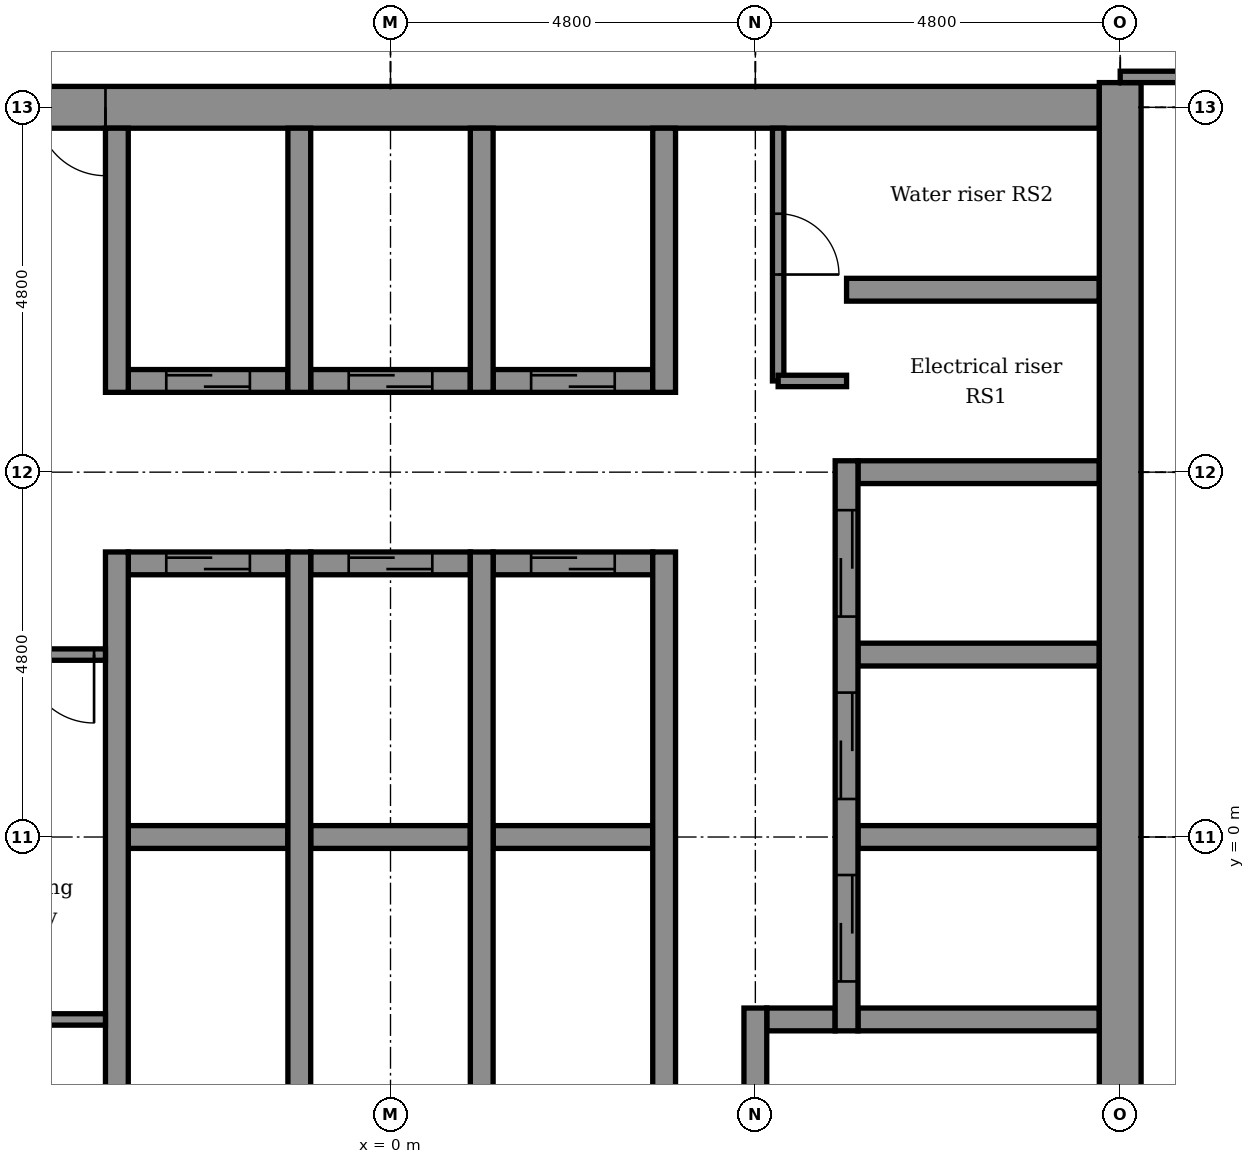
"""IFC4 building model, lengths in metres.
Left out: names, types, materials, properties, quantities, classifications, styles, units other than length and angle.
Written with IfcOpenShell. Run it as: python <this file> out.ifc"""

import sys

from ifc_helpers import new_model, si_unit, direction, frame, frame_2d, origin, place, context, subcontext, project, spatial, rectangle, extrude, element, fill, save


model = new_model("IFC4")
c1 = context("Model", 3, precision=1e-05, world=origin(), true_north=direction((0.0, 1.0)))
c2 = subcontext(c1, "Body", "Model", "MODEL_VIEW")
j1 = project(units=[si_unit("LENGTHUNIT", "METRE"), si_unit("PLANEANGLEUNIT", "RADIAN")], contexts=[c1])
p1 = place(None, origin())
s1 = spatial("IfcSite", under=j1, at=p1, CompositionType="ELEMENT")
p2 = place(p1, origin())
s2 = spatial("IfcBuilding", under=s1, at=p2, CompositionType="ELEMENT")
p3 = place(p2, frame((0.0, 0.0, 269.6)))
s3 = spatial("IfcBuildingStorey", under=s2, at=p3, CompositionType="ELEMENT", Elevation=269.6)
p4 = place(p3, frame((4.95, -2.4, -0.15), z_axis=(0.0, 0.0, 1.0), x_axis=(1.0, 0.0, 0.0)))
e1 = element("IfcWall", 1, at=p4, inside=s3, PredefinedType="STANDARD", context=c2, shape_type="SweptSolid", body=[
    extrude(rectangle(XDim=0.9, YDim=0.3, at=frame_2d((0.45, 0.0))), origin(), (0.0, 0.0, 1.0), 3.9),
])
p5 = place(p3, frame((6.15, -2.4, -0.15), z_axis=(0.0, 0.0, 1.0), x_axis=(1.0, 0.0, 0.0)))
e2 = element("IfcWall", 2, at=p5, inside=s3, PredefinedType="STANDARD", context=c2, shape_type="SweptSolid", body=[
    extrude(rectangle(XDim=3.175, YDim=0.3, at=frame_2d((1.587, 0.0))), origin(), (0.0, 0.0, 1.0), 3.9),
])
p6 = place(p3, frame((-3.45, 0.0, -0.15), z_axis=(0.0, 0.0, 1.0), x_axis=(1.0, 0.0, 0.0)))
e3 = element("IfcWall", 3, at=p6, inside=s3, PredefinedType="STANDARD", context=c2, shape_type="SweptSolid", body=[
    extrude(rectangle(XDim=2.1, YDim=0.3, at=frame_2d((1.05, 0.0))), origin(), (0.0, 0.0, 1.0), 3.9),
])
p7 = place(p3, frame((-1.05, 0.0, -0.15), z_axis=(0.0, 0.0, 1.0), x_axis=(1.0, 0.0, 0.0)))
e4 = element("IfcWall", 4, at=p7, inside=s3, PredefinedType="STANDARD", context=c2, shape_type="SweptSolid", body=[
    extrude(rectangle(XDim=2.1, YDim=0.3, at=frame_2d((1.05, 0.0))), origin(), (0.0, 0.0, 1.0), 3.9),
])
p8 = place(p3, frame((1.35, 0.0, -0.15), z_axis=(0.0, 0.0, 1.0), x_axis=(1.0, 0.0, 0.0)))
e5 = element("IfcWall", 5, at=p8, inside=s3, PredefinedType="STANDARD", context=c2, shape_type="SweptSolid", body=[
    extrude(rectangle(XDim=2.1, YDim=0.3, at=frame_2d((1.05, 0.0))), origin(), (0.0, 0.0, 1.0), 3.9),
])
for number, where, z_axis, x_axis in (
    (6, (6.15, 0.0, -0.15), (0.0, 0.0, 1.0), (1.0, 0.0, 0.0)),
    (7, (6.15, 2.4, -0.15), (0.0, 0.0, 1.0), (1.0, 0.0, 0.0)),
):
    element("IfcWall", number, at=place(p3, frame(where, z_axis=z_axis, x_axis=x_axis)), inside=s3, PredefinedType="STANDARD", context=c2, shape_type="SweptSolid", body=[
        extrude(rectangle(XDim=3.175, YDim=0.3, at=frame_2d((1.587, 0.0))), origin(), (0.0, 0.0, 1.0), 3.9),
    ])
p9 = place(p3, frame((-3.45, 3.6, -0.15), z_axis=(0.0, 0.0, 1.0), x_axis=(1.0, 0.0, 0.0)))
e8 = element("IfcWall", 8, at=p9, inside=s3, PredefinedType="STANDARD", context=c2, shape_type="SweptSolid", body=[
    extrude(rectangle(XDim=2.1, YDim=0.3, at=frame_2d((1.05, 0.0))), origin(), (0.0, 0.0, 1.0), 3.9),
])
p10 = place(p9, frame((0.5, 0.0, 0.15)))
e9 = element("IfcOpeningElement", 9, at=p10, cuts=e8, PredefinedType="OPENING", context=c2, shape_type="SweptSolid", body=[
    extrude(rectangle(XDim=1.1, YDim=2.1, at=frame_2d((0.55, 1.05))), frame((0.0, 0.16, 0.0), z_axis=(0.0, -1.0, 0.0), x_axis=(1.0, 0.0, 0.0)), (0.0, 0.0, 1.0), 0.32),
])
p11 = place(p3, frame((-1.05, 3.6, -0.15), z_axis=(0.0, 0.0, 1.0), x_axis=(1.0, 0.0, 0.0)))
e10 = element("IfcWall", 10, at=p11, inside=s3, PredefinedType="STANDARD", context=c2, shape_type="SweptSolid", body=[
    extrude(rectangle(XDim=2.1, YDim=0.3, at=frame_2d((1.05, 0.0))), origin(), (0.0, 0.0, 1.0), 3.9),
])
p12 = place(p11, frame((0.5, 0.0, 0.15)))
e11 = element("IfcOpeningElement", 11, at=p12, cuts=e10, PredefinedType="OPENING", context=c2, shape_type="SweptSolid", body=[
    extrude(rectangle(XDim=1.1, YDim=2.1, at=frame_2d((0.55, 1.05))), frame((0.0, 0.16, 0.0), z_axis=(0.0, -1.0, 0.0), x_axis=(1.0, 0.0, 0.0)), (0.0, 0.0, 1.0), 0.32),
])
p13 = place(p3, frame((1.35, 3.6, -0.15), z_axis=(0.0, 0.0, 1.0), x_axis=(1.0, 0.0, 0.0)))
e12 = element("IfcWall", 12, at=p13, inside=s3, PredefinedType="STANDARD", context=c2, shape_type="SweptSolid", body=[
    extrude(rectangle(XDim=2.1, YDim=0.3, at=frame_2d((1.05, 0.0))), origin(), (0.0, 0.0, 1.0), 3.9),
])
p14 = place(p13, frame((0.5, 0.0, 0.15)))
e13 = element("IfcOpeningElement", 13, at=p14, cuts=e12, PredefinedType="OPENING", context=c2, shape_type="SweptSolid", body=[
    extrude(rectangle(XDim=1.1, YDim=2.1, at=frame_2d((0.55, 1.05))), frame((0.0, 0.16, 0.0), z_axis=(0.0, -1.0, 0.0), x_axis=(1.0, 0.0, 0.0)), (0.0, 0.0, 1.0), 0.32),
])
p15 = place(p3, frame((6.15, 4.8, -0.15), z_axis=(0.0, 0.0, 1.0), x_axis=(1.0, 0.0, 0.0)))
e14 = element("IfcWall", 14, at=p15, inside=s3, PredefinedType="STANDARD", context=c2, shape_type="SweptSolid", body=[
    extrude(rectangle(XDim=3.175, YDim=0.3, at=frame_2d((1.587, 0.0))), origin(), (0.0, 0.0, 1.0), 3.9),
])
p16 = place(p3, frame((-3.45, 6.0, -0.15), z_axis=(0.0, 0.0, 1.0), x_axis=(1.0, 0.0, 0.0)))
e15 = element("IfcWall", 15, at=p16, inside=s3, PredefinedType="STANDARD", context=c2, shape_type="SweptSolid", body=[
    extrude(rectangle(XDim=2.1, YDim=0.3, at=frame_2d((1.05, 0.0))), origin(), (0.0, 0.0, 1.0), 3.9),
])
p17 = place(p16, frame((0.5, 0.0, 0.15)))
e16 = element("IfcOpeningElement", 16, at=p17, cuts=e15, PredefinedType="OPENING", context=c2, shape_type="SweptSolid", body=[
    extrude(rectangle(XDim=1.1, YDim=2.1, at=frame_2d((0.55, 1.05))), frame((0.0, 0.16, 0.0), z_axis=(0.0, -1.0, 0.0), x_axis=(1.0, 0.0, 0.0)), (0.0, 0.0, 1.0), 0.32),
])
p18 = place(p3, frame((-1.05, 6.0, -0.15), z_axis=(0.0, 0.0, 1.0), x_axis=(1.0, 0.0, 0.0)))
e17 = element("IfcWall", 17, at=p18, inside=s3, PredefinedType="STANDARD", context=c2, shape_type="SweptSolid", body=[
    extrude(rectangle(XDim=2.1, YDim=0.3, at=frame_2d((1.05, 0.0))), origin(), (0.0, 0.0, 1.0), 3.9),
])
p19 = place(p18, frame((0.5, 0.0, 0.15)))
e18 = element("IfcOpeningElement", 18, at=p19, cuts=e17, PredefinedType="OPENING", context=c2, shape_type="SweptSolid", body=[
    extrude(rectangle(XDim=1.1, YDim=2.1, at=frame_2d((0.55, 1.05))), frame((0.0, 0.16, 0.0), z_axis=(0.0, -1.0, 0.0), x_axis=(1.0, 0.0, 0.0)), (0.0, 0.0, 1.0), 0.32),
])
p20 = place(p3, frame((1.35, 6.0, -0.15), z_axis=(0.0, 0.0, 1.0), x_axis=(1.0, 0.0, 0.0)))
e19 = element("IfcWall", 19, at=p20, inside=s3, PredefinedType="STANDARD", context=c2, shape_type="SweptSolid", body=[
    extrude(rectangle(XDim=2.1, YDim=0.3, at=frame_2d((1.05, 0.0))), origin(), (0.0, 0.0, 1.0), 3.9),
])
p21 = place(p20, frame((0.5, 0.0, 0.15)))
e20 = element("IfcOpeningElement", 20, at=p21, cuts=e19, PredefinedType="OPENING", context=c2, shape_type="SweptSolid", body=[
    extrude(rectangle(XDim=1.1, YDim=2.1, at=frame_2d((0.55, 1.05))), frame((0.0, 0.16, 0.0), z_axis=(0.0, -1.0, 0.0), x_axis=(1.0, 0.0, 0.0)), (0.0, 0.0, 1.0), 0.32),
])
p22 = place(p3, frame((6.0, 7.2, -0.15), z_axis=(0.0, 0.0, 1.0), x_axis=(1.0, 0.0, 0.0)))
e21 = element("IfcWall", 21, at=p22, inside=s3, PredefinedType="STANDARD", context=c2, shape_type="SweptSolid", body=[
    extrude(rectangle(XDim=3.325, YDim=0.3, at=frame_2d((1.663, 0.0))), origin(), (0.0, 0.0, 1.0), 3.9),
])
p23 = place(p3, frame((-5.25, 9.6, -0.15), z_axis=(0.0, 0.0, 1.0), x_axis=(1.0, 0.0, 0.0)))
e22 = element("IfcWall", 22, at=p23, inside=s3, PredefinedType="SHEAR", context=c2, shape_type="SweptSolid", body=[
    extrude(rectangle(XDim=14.575, YDim=0.55, at=frame_2d((7.288, 0.0))), origin(), (0.0, 0.0, 1.0), 3.9),
])
p24 = place(p23, frame((0.6, 0.0, 0.15)))
e23 = element("IfcOpeningElement", 23, at=p24, cuts=e22, PredefinedType="OPENING", context=c2, shape_type="SweptSolid", body=[
    extrude(rectangle(XDim=0.9, YDim=2.1, at=frame_2d((0.45, 1.05))), frame((0.0, 0.285, 0.0), z_axis=(0.0, -1.0, 0.0), x_axis=(1.0, 0.0, 0.0)), (0.0, 0.0, 1.0), 0.57),
])
p25 = place(p3, frame((-3.6, -3.75, -0.15), z_axis=(0.0, 0.0, 1.0), x_axis=(0.0, 1.0, 0.0)))
e24 = element("IfcWall", 24, at=p25, inside=s3, PredefinedType="STANDARD", context=c2, shape_type="SweptSolid", body=[
    extrude(rectangle(XDim=7.5, YDim=0.3, at=frame_2d((3.75, 0.0))), origin(), (0.0, 0.0, 1.0), 3.9),
])
p26 = place(p3, frame((-3.6, 5.85, -0.15), z_axis=(0.0, 0.0, 1.0), x_axis=(0.0, 1.0, 0.0)))
e25 = element("IfcWall", 25, at=p26, inside=s3, PredefinedType="STANDARD", context=c2, shape_type="SweptSolid", body=[
    extrude(rectangle(XDim=3.475, YDim=0.3, at=frame_2d((1.737, 0.0))), origin(), (0.0, 0.0, 1.0), 3.9),
])
p27 = place(p3, frame((-1.2, -3.75, -0.15), z_axis=(0.0, 0.0, 1.0), x_axis=(0.0, 1.0, 0.0)))
e26 = element("IfcWall", 26, at=p27, inside=s3, PredefinedType="STANDARD", context=c2, shape_type="SweptSolid", body=[
    extrude(rectangle(XDim=7.5, YDim=0.3, at=frame_2d((3.75, 0.0))), origin(), (0.0, 0.0, 1.0), 3.9),
])
p28 = place(p3, frame((-1.2, 5.85, -0.15), z_axis=(0.0, 0.0, 1.0), x_axis=(0.0, 1.0, 0.0)))
e27 = element("IfcWall", 27, at=p28, inside=s3, PredefinedType="STANDARD", context=c2, shape_type="SweptSolid", body=[
    extrude(rectangle(XDim=3.475, YDim=0.3, at=frame_2d((1.737, 0.0))), origin(), (0.0, 0.0, 1.0), 3.9),
])
p29 = place(p3, frame((1.2, -3.75, -0.15), z_axis=(0.0, 0.0, 1.0), x_axis=(0.0, 1.0, 0.0)))
e28 = element("IfcWall", 28, at=p29, inside=s3, PredefinedType="STANDARD", context=c2, shape_type="SweptSolid", body=[
    extrude(rectangle(XDim=7.5, YDim=0.3, at=frame_2d((3.75, 0.0))), origin(), (0.0, 0.0, 1.0), 3.9),
])
p30 = place(p3, frame((1.2, 5.85, -0.15), z_axis=(0.0, 0.0, 1.0), x_axis=(0.0, 1.0, 0.0)))
e29 = element("IfcWall", 29, at=p30, inside=s3, PredefinedType="STANDARD", context=c2, shape_type="SweptSolid", body=[
    extrude(rectangle(XDim=3.475, YDim=0.3, at=frame_2d((1.737, 0.0))), origin(), (0.0, 0.0, 1.0), 3.9),
])
p31 = place(p3, frame((3.6, -3.75, -0.15), z_axis=(0.0, 0.0, 1.0), x_axis=(0.0, 1.0, 0.0)))
e30 = element("IfcWall", 30, at=p31, inside=s3, PredefinedType="STANDARD", context=c2, shape_type="SweptSolid", body=[
    extrude(rectangle(XDim=7.5, YDim=0.3, at=frame_2d((3.75, 0.0))), origin(), (0.0, 0.0, 1.0), 3.9),
])
p32 = place(p3, frame((3.6, 5.85, -0.15), z_axis=(0.0, 0.0, 1.0), x_axis=(0.0, 1.0, 0.0)))
e31 = element("IfcWall", 31, at=p32, inside=s3, PredefinedType="STANDARD", context=c2, shape_type="SweptSolid", body=[
    extrude(rectangle(XDim=3.475, YDim=0.3, at=frame_2d((1.737, 0.0))), origin(), (0.0, 0.0, 1.0), 3.9),
])
p33 = place(p3, frame((4.8, -9.325, -0.15), z_axis=(0.0, 0.0, 1.0), x_axis=(0.0, 1.0, 0.0)))
e32 = element("IfcWall", 32, at=p33, inside=s3, PredefinedType="STANDARD", context=c2, shape_type="SweptSolid", body=[
    extrude(rectangle(XDim=7.075, YDim=0.3, at=frame_2d((3.538, 0.0))), origin(), (0.0, 0.0, 1.0), 3.9),
])
p34 = place(p33, frame((3.875, 0.0, 0.15)))
e33 = element("IfcOpeningElement", 33, at=p34, cuts=e32, PredefinedType="OPENING", context=c2, shape_type="SweptSolid", body=[
    extrude(rectangle(XDim=1.2, YDim=2.1, at=frame_2d((0.6, 1.05))), frame((0.0, 0.16, 0.0), z_axis=(0.0, -1.0, 0.0), x_axis=(1.0, 0.0, 0.0)), (0.0, 0.0, 1.0), 0.32),
])
p35 = place(p3, frame((6.0, -2.55, -0.15), z_axis=(0.0, 0.0, 1.0), x_axis=(0.0, 1.0, 0.0)))
e34 = element("IfcWall", 34, at=p35, inside=s3, PredefinedType="STANDARD", context=c2, shape_type="SweptSolid", body=[
    extrude(rectangle(XDim=7.5, YDim=0.3, at=frame_2d((3.75, 0.0))), origin(), (0.0, 0.0, 1.0), 3.9),
])
p36 = place(p35, frame((0.65, 0.0, 0.15)))
e35 = element("IfcOpeningElement", 35, at=p36, cuts=e34, PredefinedType="OPENING", context=c2, shape_type="SweptSolid", body=[
    extrude(rectangle(XDim=1.4, YDim=2.1, at=frame_2d((0.7, 1.05))), frame((0.0, 0.16, 0.0), z_axis=(0.0, -1.0, 0.0), x_axis=(1.0, 0.0, 0.0)), (0.0, 0.0, 1.0), 0.32),
])
p37 = place(p35, frame((3.05, 0.0, 0.15)))
e36 = element("IfcOpeningElement", 36, at=p37, cuts=e34, PredefinedType="OPENING", context=c2, shape_type="SweptSolid", body=[
    extrude(rectangle(XDim=1.4, YDim=2.1, at=frame_2d((0.7, 1.05))), frame((0.0, 0.16, 0.0), z_axis=(0.0, -1.0, 0.0), x_axis=(1.0, 0.0, 0.0)), (0.0, 0.0, 1.0), 0.32),
])
p38 = place(p35, frame((5.45, 0.0, 0.15)))
e37 = element("IfcOpeningElement", 37, at=p38, cuts=e34, PredefinedType="OPENING", context=c2, shape_type="SweptSolid", body=[
    extrude(rectangle(XDim=1.4, YDim=2.1, at=frame_2d((0.7, 1.05))), frame((0.0, 0.16, 0.0), z_axis=(0.0, -1.0, 0.0), x_axis=(1.0, 0.0, 0.0)), (0.0, 0.0, 1.0), 0.32),
])
p39 = place(p3, frame((9.6, -10.15, -0.15), z_axis=(0.0, 0.0, 1.0), x_axis=(0.0, 1.0, 0.0)))
e38 = element("IfcWall", 38, at=p39, inside=s3, PredefinedType="SHEAR", context=c2, shape_type="SweptSolid", body=[
    extrude(rectangle(XDim=20.075, YDim=0.55, at=frame_2d((10.038, 0.0))), origin(), (0.0, 0.0, 1.0), 3.9),
])
p40 = place(p3, frame((5.1, 6.0, 0.0), z_axis=(0.0, 0.0, 1.0), x_axis=(0.0, 1.0, 0.0)))
e39 = element("IfcWall", 39, at=p40, inside=s3, PredefinedType="PARTITIONING", context=c2, shape_type="SweptSolid", body=[
    extrude(rectangle(XDim=3.325, YDim=0.15, at=frame_2d((1.663, 0.0))), origin(), (0.0, 0.0, 1.0), 3.75),
])
p41 = place(p40, frame((1.4, 0.0, 0.0)))
e40 = element("IfcOpeningElement", 40, at=p41, cuts=e39, PredefinedType="OPENING", context=c2, shape_type="SweptSolid", body=[
    extrude(rectangle(XDim=0.8, YDim=2.1, at=frame_2d((0.4, 1.05))), frame((0.0, 0.085, 0.0), z_axis=(0.0, -1.0, 0.0), x_axis=(1.0, 0.0, 0.0)), (0.0, 0.0, 1.0), 0.17),
])
p42 = place(p3, frame((5.1, 6.0, 0.0), z_axis=(0.0, 0.0, 1.0), x_axis=(1.0, 0.0, 0.0)))
e41 = element("IfcWall", 41, at=p42, inside=s3, PredefinedType="PARTITIONING", context=c2, shape_type="SweptSolid", body=[
    extrude(rectangle(XDim=0.9, YDim=0.15, at=frame_2d((0.45, 0.0))), origin(), (0.0, 0.0, 1.0), 3.75),
])
p43 = place(p3, frame((9.6, 10.0, 0.0), z_axis=(0.0, 0.0, 1.0), x_axis=(1.0, 0.0, 0.0)))
e42 = element("IfcWall", 42, at=p43, inside=s3, PredefinedType="PARTITIONING", context=c2, shape_type="SweptSolid", body=[
    extrude(rectangle(XDim=4.955, YDim=0.15, at=frame_2d((2.477, 0.0))), origin(), (0.0, 0.0, 1.0), 3.75),
])
p44 = place(p43, frame((2.366, 0.0, 0.0)))
e43 = element("IfcOpeningElement", 43, at=p44, cuts=e42, PredefinedType="OPENING", context=c2, shape_type="SweptSolid", body=[
    extrude(rectangle(XDim=1.8, YDim=2.1, at=frame_2d((0.9, 1.05))), frame((0.0, 0.085, 0.0), z_axis=(0.0, -1.0, 0.0), x_axis=(1.0, 0.0, 0.0)), (0.0, 0.0, 1.0), 0.17),
])
p45 = place(p3, frame((-4.95, 2.4, 0.0), z_axis=(0.0, 0.0, 1.0), x_axis=(1.0, 0.0, 0.0)))
e44 = element("IfcWall", 44, at=p45, inside=s3, PredefinedType="PARTITIONING", context=c2, shape_type="SweptSolid", body=[
    extrude(rectangle(XDim=1.2, YDim=0.15, at=frame_2d((0.6, 0.0))), origin(), (0.0, 0.0, 1.0), 3.75),
])
p46 = place(p45, frame((0.15, 0.0, 0.0)))
e45 = element("IfcOpeningElement", 45, at=p46, cuts=e44, PredefinedType="OPENING", context=c2, shape_type="SweptSolid", body=[
    extrude(rectangle(XDim=0.9, YDim=2.1, at=frame_2d((0.45, 1.05))), frame((0.0, 0.085, 0.0), z_axis=(0.0, -1.0, 0.0), x_axis=(1.0, 0.0, 0.0)), (0.0, 0.0, 1.0), 0.17),
])
p47 = place(p3, frame((-4.95, -2.4, 0.0), z_axis=(0.0, 0.0, 1.0), x_axis=(1.0, 0.0, 0.0)))
e46 = element("IfcWall", 46, at=p47, inside=s3, PredefinedType="PARTITIONING", context=c2, shape_type="SweptSolid", body=[
    extrude(rectangle(XDim=1.2, YDim=0.15, at=frame_2d((0.6, 0.0))), origin(), (0.0, 0.0, 1.0), 3.75),
])
p48 = place(p41, frame((0.8, 0.0, 0.0), z_axis=(0.0, 0.0, 1.0), x_axis=(-1.0, 0.0, 0.0)))
e47 = element("IfcDoor", 47, at=p48, inside=s3, OperationType="SINGLE_SWING_LEFT", PredefinedType="DOOR", context=c2, shape_type="SweptSolid", body=[
    extrude(rectangle(XDim=0.8, YDim=2.1, at=frame_2d((0.4, 1.05))), frame((0.0, 0.025, 0.0), z_axis=(0.0, -1.0, 0.0), x_axis=(1.0, 0.0, 0.0)), (0.0, 0.0, 1.0), 0.05),
])
fill(e40, e47)
p49 = place(p36, origin())
e48 = element("IfcDoor", 48, at=p49, inside=s3, OperationType="DOUBLE_DOOR_SLIDING", PredefinedType="DOOR", context=c2, shape_type="SweptSolid", body=[
    extrude(rectangle(XDim=1.4, YDim=2.1, at=frame_2d((0.7, 1.05))), frame((0.0, 0.025, 0.0), z_axis=(0.0, -1.0, 0.0), x_axis=(1.0, 0.0, 0.0)), (0.0, 0.0, 1.0), 0.05),
])
fill(e35, e48)
p50 = place(p37, origin())
e49 = element("IfcDoor", 49, at=p50, inside=s3, OperationType="DOUBLE_DOOR_SLIDING", PredefinedType="DOOR", context=c2, shape_type="SweptSolid", body=[
    extrude(rectangle(XDim=1.4, YDim=2.1, at=frame_2d((0.7, 1.05))), frame((0.0, 0.025, 0.0), z_axis=(0.0, -1.0, 0.0), x_axis=(1.0, 0.0, 0.0)), (0.0, 0.0, 1.0), 0.05),
])
fill(e36, e49)
p51 = place(p38, origin())
e50 = element("IfcDoor", 50, at=p51, inside=s3, OperationType="DOUBLE_DOOR_SLIDING", PredefinedType="DOOR", context=c2, shape_type="SweptSolid", body=[
    extrude(rectangle(XDim=1.4, YDim=2.1, at=frame_2d((0.7, 1.05))), frame((0.0, 0.025, 0.0), z_axis=(0.0, -1.0, 0.0), x_axis=(1.0, 0.0, 0.0)), (0.0, 0.0, 1.0), 0.05),
])
fill(e37, e50)
p52 = place(p17, origin())
e51 = element("IfcDoor", 51, at=p52, inside=s3, OperationType="DOUBLE_DOOR_SLIDING", PredefinedType="DOOR", context=c2, shape_type="SweptSolid", body=[
    extrude(rectangle(XDim=1.1, YDim=2.1, at=frame_2d((0.55, 1.05))), frame((0.0, 0.025, 0.0), z_axis=(0.0, -1.0, 0.0), x_axis=(1.0, 0.0, 0.0)), (0.0, 0.0, 1.0), 0.05),
])
fill(e16, e51)
p53 = place(p19, origin())
e52 = element("IfcDoor", 52, at=p53, inside=s3, OperationType="DOUBLE_DOOR_SLIDING", PredefinedType="DOOR", context=c2, shape_type="SweptSolid", body=[
    extrude(rectangle(XDim=1.1, YDim=2.1, at=frame_2d((0.55, 1.05))), frame((0.0, 0.025, 0.0), z_axis=(0.0, -1.0, 0.0), x_axis=(1.0, 0.0, 0.0)), (0.0, 0.0, 1.0), 0.05),
])
fill(e18, e52)
p54 = place(p21, origin())
e53 = element("IfcDoor", 53, at=p54, inside=s3, OperationType="DOUBLE_DOOR_SLIDING", PredefinedType="DOOR", context=c2, shape_type="SweptSolid", body=[
    extrude(rectangle(XDim=1.1, YDim=2.1, at=frame_2d((0.55, 1.05))), frame((0.0, 0.025, 0.0), z_axis=(0.0, -1.0, 0.0), x_axis=(1.0, 0.0, 0.0)), (0.0, 0.0, 1.0), 0.05),
])
fill(e20, e53)
p55 = place(p10, origin())
e54 = element("IfcDoor", 54, at=p55, inside=s3, OperationType="DOUBLE_DOOR_SLIDING", PredefinedType="DOOR", context=c2, shape_type="SweptSolid", body=[
    extrude(rectangle(XDim=1.1, YDim=2.1, at=frame_2d((0.55, 1.05))), frame((0.0, 0.025, 0.0), z_axis=(0.0, -1.0, 0.0), x_axis=(1.0, 0.0, 0.0)), (0.0, 0.0, 1.0), 0.05),
])
fill(e9, e54)
p56 = place(p12, origin())
e55 = element("IfcDoor", 55, at=p56, inside=s3, OperationType="DOUBLE_DOOR_SLIDING", PredefinedType="DOOR", context=c2, shape_type="SweptSolid", body=[
    extrude(rectangle(XDim=1.1, YDim=2.1, at=frame_2d((0.55, 1.05))), frame((0.0, 0.025, 0.0), z_axis=(0.0, -1.0, 0.0), x_axis=(1.0, 0.0, 0.0)), (0.0, 0.0, 1.0), 0.05),
])
fill(e11, e55)
p57 = place(p14, origin())
e56 = element("IfcDoor", 56, at=p57, inside=s3, OperationType="DOUBLE_DOOR_SLIDING", PredefinedType="DOOR", context=c2, shape_type="SweptSolid", body=[
    extrude(rectangle(XDim=1.1, YDim=2.1, at=frame_2d((0.55, 1.05))), frame((0.0, 0.025, 0.0), z_axis=(0.0, -1.0, 0.0), x_axis=(1.0, 0.0, 0.0)), (0.0, 0.0, 1.0), 0.05),
])
fill(e13, e56)
p58 = place(p24, frame((0.9, 0.0, 0.0), z_axis=(0.0, 0.0, 1.0), x_axis=(-1.0, 0.0, 0.0)))
e57 = element("IfcDoor", 57, at=p58, inside=s3, OperationType="SINGLE_SWING_RIGHT", PredefinedType="DOOR", context=c2, shape_type="SweptSolid", body=[
    extrude(rectangle(XDim=0.9, YDim=2.1, at=frame_2d((0.45, 1.05))), frame((0.0, 0.025, 0.0), z_axis=(0.0, -1.0, 0.0), x_axis=(1.0, 0.0, 0.0)), (0.0, 0.0, 1.0), 0.05),
])
fill(e23, e57)
p59 = place(p46, frame((0.9, 0.0, 0.0), z_axis=(0.0, 0.0, 1.0), x_axis=(-1.0, 0.0, 0.0)))
e58 = element("IfcDoor", 58, at=p59, inside=s3, OperationType="SINGLE_SWING_RIGHT", PredefinedType="DOOR", context=c2, shape_type="SweptSolid", body=[
    extrude(rectangle(XDim=0.9, YDim=2.1, at=frame_2d((0.45, 1.05))), frame((0.0, 0.025, 0.0), z_axis=(0.0, -1.0, 0.0), x_axis=(1.0, 0.0, 0.0)), (0.0, 0.0, 1.0), 0.05),
])
fill(e45, e58)
save(model, sys.argv[1])
